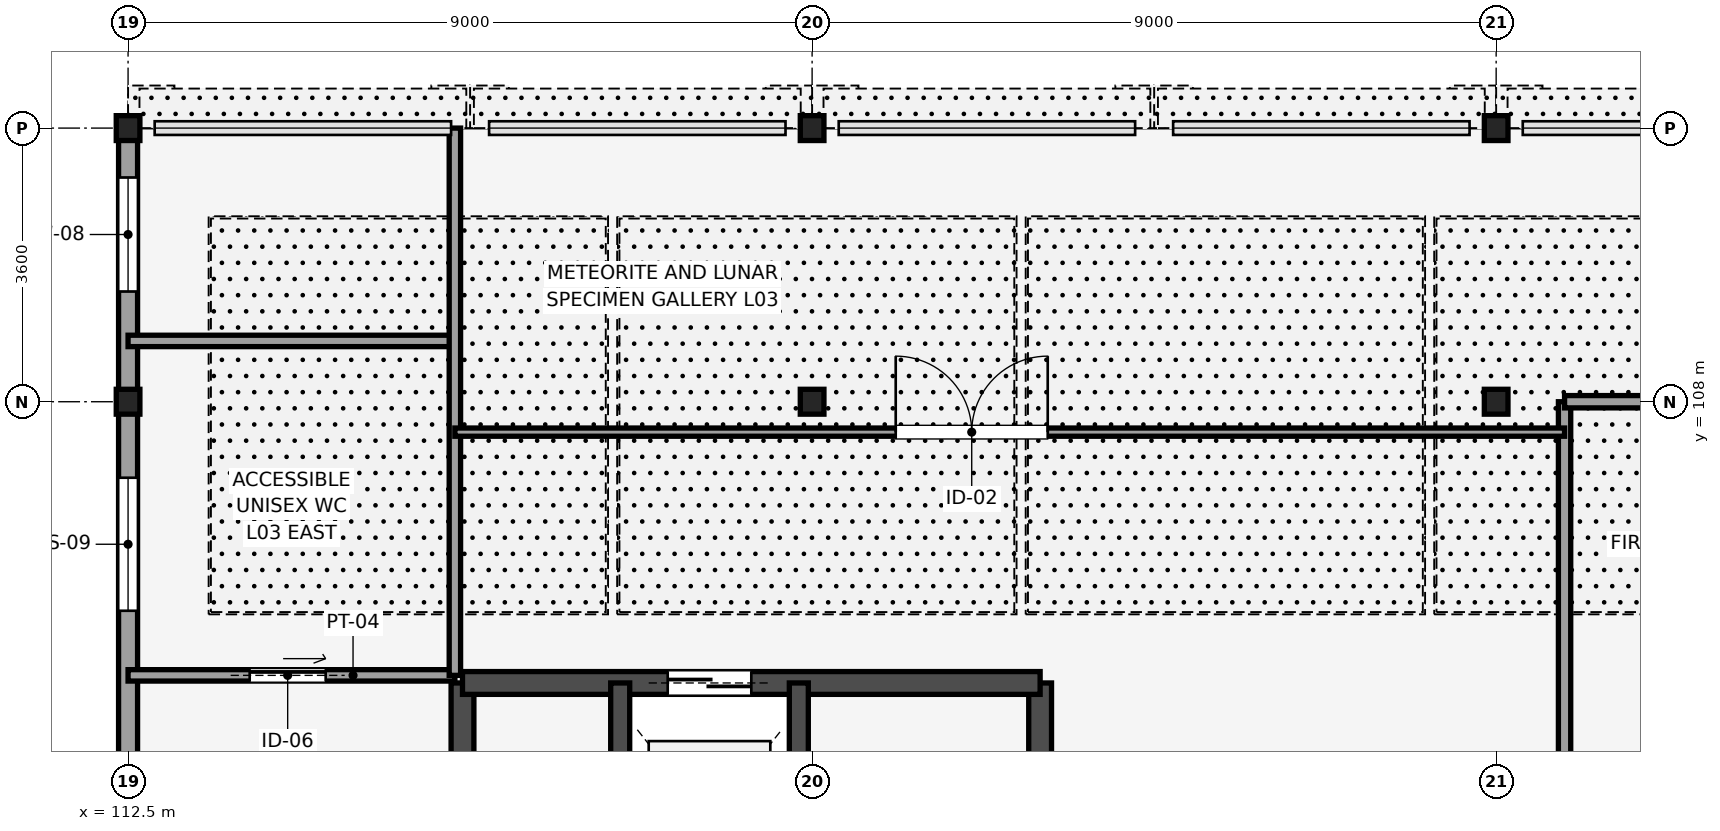
"""IFC4 building model, lengths in metres.
Left out: names, types, materials, properties, quantities, classifications, styles, units other than length and angle.
Written with IfcOpenShell. Run it as: python <this file> out.ifc"""

import sys

from ifc_helpers import new_model, si_unit, direction, frame, frame_2d, origin, origin_2d, place, context, subcontext, project, spatial, rectangle, i_section, extrude, element, fill, save


model = new_model("IFC4")
c1 = context("Model", 3, precision=1e-05, world=origin(), true_north=direction((0.0, 1.0)))
c2 = subcontext(c1, "Body", "Model", "MODEL_VIEW")
j1 = project(units=[si_unit("LENGTHUNIT", "METRE"), si_unit("PLANEANGLEUNIT", "RADIAN")], contexts=[c1])
p1 = place(None, origin())
s1 = spatial("IfcSite", under=j1, at=p1, CompositionType="ELEMENT")
p2 = place(p1, origin())
s2 = spatial("IfcBuilding", under=s1, at=p2, CompositionType="ELEMENT")
p3 = place(p2, frame((0.0, 0.0, 14.4)))
s3 = spatial("IfcBuildingStorey", under=s2, at=p3, CompositionType="ELEMENT", Elevation=14.4)
for number, where, z_axis, x_axis in (
    (1, (112.5, 108.0, 0.0), (0.0, 0.0, 1.0), (1.0, 0.0, 0.0)),
    (2, (112.5, 111.6, 0.0), (0.0, 0.0, 1.0), (1.0, 0.0, 0.0)),
    (3, (121.5, 108.0, 0.0), (0.0, 0.0, 1.0), (1.0, 0.0, 0.0)),
    (4, (121.5, 111.6, 0.0), (0.0, 0.0, 1.0), (1.0, 0.0, 0.0)),
    (5, (130.5, 108.0, 0.0), (0.0, 0.0, 1.0), (1.0, 0.0, 0.0)),
    (6, (130.5, 111.6, 0.0), (0.0, 0.0, 1.0), (1.0, 0.0, 0.0)),
):
    element("IfcColumn", number, at=place(p3, frame(where, z_axis=z_axis, x_axis=x_axis)), inside=s3, PredefinedType="COLUMN", context=c2, shape_type="SweptSolid", body=[
        extrude(i_section(OverallWidth=0.311, OverallDepth=0.327, WebThickness=0.016, FlangeThickness=0.025, FilletRadius=0.017, at=origin_2d()), origin(), (0.0, 0.0, 1.0), 4.5),
    ])
p4 = place(p3, frame((116.9, 96.7, 0.0), z_axis=(0.0, 0.0, 1.0), x_axis=(0.0, 1.0, 0.0)))
e7 = element("IfcWall", 7, at=p4, inside=s3, PredefinedType="SHEAR", context=c2, shape_type="SweptSolid", body=[
    extrude(rectangle(XDim=7.6, YDim=0.3, at=frame_2d((3.8, 0.0))), origin(), (0.0, 0.0, 1.0), 4.5),
])
p5 = place(p4, frame((0.45, 0.0, 0.0)))
e8 = element("IfcOpeningElement", 8, at=p5, cuts=e7, PredefinedType="OPENING", context=c2, shape_type="SweptSolid", body=[
    extrude(rectangle(XDim=1.15, YDim=2.15, at=frame_2d((0.575, 1.075))), frame((0.0, 0.16, 0.0), z_axis=(0.0, -1.0, 0.0), x_axis=(1.0, 0.0, 0.0)), (0.0, 0.0, 1.0), 0.32),
])
p6 = place(p3, frame((124.5, 96.7, 0.0), z_axis=(0.0, 0.0, 1.0), x_axis=(0.0, 1.0, 0.0)))
e9 = element("IfcWall", 9, at=p6, inside=s3, PredefinedType="SHEAR", context=c2, shape_type="SweptSolid", body=[
    extrude(rectangle(XDim=7.6, YDim=0.3, at=frame_2d((3.8, 0.0))), origin(), (0.0, 0.0, 1.0), 4.5),
])
p7 = place(p3, frame((116.9, 104.3, 0.0), z_axis=(0.0, 0.0, 1.0), x_axis=(1.0, 0.0, 0.0)))
e10 = element("IfcWall", 10, at=p7, inside=s3, PredefinedType="SHEAR", context=c2, shape_type="SweptSolid", body=[
    extrude(rectangle(XDim=7.6, YDim=0.3, at=frame_2d((3.8, 0.0))), origin(), (0.0, 0.0, 1.0), 4.5),
])
p8 = place(p7, frame((2.7, 0.0, 0.0)))
e11 = element("IfcOpeningElement", 11, at=p8, cuts=e10, PredefinedType="OPENING", context=c2, shape_type="SweptSolid", body=[
    extrude(rectangle(XDim=1.1, YDim=2.2, at=frame_2d((0.55, 1.1))), frame((0.0, 0.16, 0.0), z_axis=(0.0, -1.0, 0.0), x_axis=(1.0, 0.0, 0.0)), (0.0, 0.0, 1.0), 0.32),
])
for number, where, z_axis, x_axis in (
    (12, (118.975, 100.695, 0.0), (0.0, 0.0, 1.0), (0.0, 1.0, 0.0)),
    (13, (121.325, 100.695, 0.0), (0.0, 0.0, 1.0), (0.0, 1.0, 0.0)),
):
    element("IfcWall", number, at=place(p3, frame(where, z_axis=z_axis, x_axis=x_axis)), inside=s3, PredefinedType="SHEAR", context=c2, shape_type="SweptSolid", body=[
        extrude(rectangle(XDim=3.605, YDim=0.25, at=frame_2d((1.802, 0.0))), origin(), (0.0, 0.0, 1.0), 4.5),
    ])
p9 = place(p3, frame((112.5, 111.6, 0.0), z_axis=(0.0, 0.0, 1.0), x_axis=(0.0, -1.0, 0.0)))
e14 = element("IfcWall", 14, at=p9, inside=s3, PredefinedType="STANDARD", context=c2, shape_type="SweptSolid", body=[
    extrude(rectangle(XDim=12.6, YDim=0.25, at=frame_2d((6.3, 0.0))), origin(), (0.0, 0.0, 1.0), 3.816),
])
p10 = place(p9, frame((0.65, 0.0, 1.0)))
e15 = element("IfcOpeningElement", 15, at=p10, cuts=e14, PredefinedType="OPENING", context=c2, shape_type="SweptSolid", body=[
    extrude(rectangle(XDim=1.5, YDim=1.5, at=frame_2d((0.75, 0.75))), frame((0.0, 0.135, 0.0), z_axis=(0.0, -1.0, 0.0), x_axis=(1.0, 0.0, 0.0)), (0.0, 0.0, 1.0), 0.27),
])
p11 = place(p9, frame((8.9, 0.0, 1.0)))
e16 = element("IfcOpeningElement", 16, at=p11, cuts=e14, PredefinedType="OPENING", context=c2, shape_type="SweptSolid", body=[
    extrude(rectangle(XDim=1.5, YDim=1.5, at=frame_2d((0.75, 0.75))), frame((0.0, 0.135, 0.0), z_axis=(0.0, -1.0, 0.0), x_axis=(1.0, 0.0, 0.0)), (0.0, 0.0, 1.0), 0.27),
])
p12 = place(p9, frame((4.6, 0.0, 1.0)))
e17 = element("IfcOpeningElement", 17, at=p12, cuts=e14, PredefinedType="OPENING", context=c2, shape_type="SweptSolid", body=[
    extrude(rectangle(XDim=1.75, YDim=1.55, at=frame_2d((0.875, 0.775))), frame((0.0, 0.135, 0.0), z_axis=(0.0, -1.0, 0.0), x_axis=(1.0, 0.0, 0.0)), (0.0, 0.0, 1.0), 0.27),
])
p13 = place(p3, frame((131.4, 96.6, 0.0), z_axis=(0.0, 0.0, 1.0), x_axis=(0.0, 1.0, 0.0)))
e18 = element("IfcWall", 18, at=p13, inside=s3, PredefinedType="PARTITIONING", context=c2, shape_type="SweptSolid", body=[
    extrude(rectangle(XDim=11.4, YDim=0.162, at=frame_2d((5.7, 0.0))), origin(), (0.0, 0.0, 1.0), 4.32),
])
p14 = place(p13, frame((3.8, 0.0, 0.0)))
e19 = element("IfcOpeningElement", 19, at=p14, cuts=e18, PredefinedType="OPENING", context=c2, shape_type="SweptSolid", body=[
    extrude(rectangle(XDim=1.51, YDim=2.175, at=frame_2d((0.755, 1.087))), frame((0.0, 0.091, 0.0), z_axis=(0.0, -1.0, 0.0), x_axis=(1.0, 0.0, 0.0)), (0.0, 0.0, 1.0), 0.182),
])
p15 = place(p3, frame((131.4, 108.0, 0.0), z_axis=(0.0, 0.0, 1.0), x_axis=(1.0, 0.0, 0.0)))
e20 = element("IfcWall", 20, at=p15, inside=s3, PredefinedType="PARTITIONING", context=c2, shape_type="SweptSolid", body=[
    extrude(rectangle(XDim=11.6, YDim=0.162, at=frame_2d((5.8, 0.0))), origin(), (0.0, 0.0, 1.0), 3.816),
])
p16 = place(p3, frame((112.5, 104.4, 0.0), z_axis=(0.0, 0.0, 1.0), x_axis=(1.0, 0.0, 0.0)))
e21 = element("IfcWall", 21, at=p16, inside=s3, PredefinedType="PARTITIONING", context=c2, shape_type="SweptSolid", body=[
    extrude(rectangle(XDim=4.3, YDim=0.15, at=frame_2d((2.15, 0.0))), origin(), (0.0, 0.0, 1.0), 4.32),
])
p17 = place(p16, frame((1.6, 0.0, 0.0)))
e22 = element("IfcOpeningElement", 22, at=p17, cuts=e21, PredefinedType="OPENING", context=c2, shape_type="SweptSolid", body=[
    extrude(rectangle(XDim=1.0, YDim=2.15, at=frame_2d((0.5, 1.075))), frame((0.0, 0.085, 0.0), z_axis=(0.0, -1.0, 0.0), x_axis=(1.0, 0.0, 0.0)), (0.0, 0.0, 1.0), 0.17),
])
p18 = place(p3, frame((112.5, 108.8, 0.0), z_axis=(0.0, 0.0, 1.0), x_axis=(1.0, 0.0, 0.0)))
e23 = element("IfcWall", 23, at=p18, inside=s3, PredefinedType="PARTITIONING", context=c2, shape_type="SweptSolid", body=[
    extrude(rectangle(XDim=4.3, YDim=0.15, at=frame_2d((2.15, 0.0))), origin(), (0.0, 0.0, 1.0), 4.32),
])
p19 = place(p3, frame((116.8, 104.4, 0.0), z_axis=(0.0, 0.0, 1.0), x_axis=(0.0, 1.0, 0.0)))
e24 = element("IfcWall", 24, at=p19, inside=s3, PredefinedType="PARTITIONING", context=c2, shape_type="SweptSolid", body=[
    extrude(rectangle(XDim=7.2, YDim=0.15, at=frame_2d((3.6, 0.0))), origin(), (0.0, 0.0, 1.0), 4.32),
])
p20 = place(p3, frame((116.8, 107.6, 0.0), z_axis=(0.0, 0.0, 1.0), x_axis=(1.0, 0.0, 0.0)))
e25 = element("IfcWall", 25, at=p20, inside=s3, PredefinedType="PARTITIONING", context=c2, shape_type="SweptSolid", body=[
    extrude(rectangle(XDim=14.6, YDim=0.108, at=frame_2d((7.3, 0.0))), origin(), (0.0, 0.0, 1.0), 4.32),
])
p21 = place(p20, frame((5.8, 0.0, 0.0)))
e26 = element("IfcOpeningElement", 26, at=p21, cuts=e25, PredefinedType="OPENING", context=c2, shape_type="SweptSolid", body=[
    extrude(rectangle(XDim=2.0, YDim=2.4, at=frame_2d((1.0, 1.2))), frame((0.0, 0.064, 0.0), z_axis=(0.0, -1.0, 0.0), x_axis=(1.0, 0.0, 0.0)), (0.0, 0.0, 1.0), 0.128),
])
p22 = place(p10, origin())
e27 = element("IfcWindow", 27, at=p22, inside=s3, PartitioningType="SINGLE_PANEL", PredefinedType="WINDOW", context=c2, shape_type="SweptSolid", body=[
    extrude(rectangle(XDim=1.5, YDim=1.5, at=frame_2d((0.75, 0.75))), frame((0.0, 0.03, 0.0), z_axis=(0.0, -1.0, 0.0), x_axis=(1.0, 0.0, 0.0)), (0.0, 0.0, 1.0), 0.06),
])
fill(e15, e27)
p23 = place(p12, origin())
e28 = element("IfcWindow", 28, at=p23, inside=s3, PartitioningType="SINGLE_PANEL", PredefinedType="WINDOW", context=c2, shape_type="SweptSolid", body=[
    extrude(rectangle(XDim=1.75, YDim=1.55, at=frame_2d((0.875, 0.775))), frame((0.0, 0.03, 0.0), z_axis=(0.0, -1.0, 0.0), x_axis=(1.0, 0.0, 0.0)), (0.0, 0.0, 1.0), 0.06),
])
fill(e17, e28)
p24 = place(p8, origin())
e29 = element("IfcDoor", 29, at=p24, inside=s3, OperationType="DOUBLE_DOOR_SLIDING", PredefinedType="DOOR", context=c2, shape_type="SweptSolid", body=[
    extrude(rectangle(XDim=1.1, YDim=2.2, at=frame_2d((0.55, 1.1))), frame((0.0, 0.025, 0.0), z_axis=(0.0, -1.0, 0.0), x_axis=(1.0, 0.0, 0.0)), (0.0, 0.0, 1.0), 0.05),
])
fill(e11, e29)
p25 = place(p17, origin())
e30 = element("IfcDoor", 30, at=p25, inside=s3, OperationType="SLIDING_TO_LEFT", PredefinedType="DOOR", context=c2, shape_type="SweptSolid", body=[
    extrude(rectangle(XDim=1.0, YDim=2.15, at=frame_2d((0.5, 1.075))), frame((0.0, 0.025, 0.0), z_axis=(0.0, -1.0, 0.0), x_axis=(1.0, 0.0, 0.0)), (0.0, 0.0, 1.0), 0.05),
])
fill(e22, e30)
p26 = place(p21, origin())
e31 = element("IfcDoor", 31, at=p26, inside=s3, OperationType="DOUBLE_DOOR_DOUBLE_SWING", PredefinedType="DOOR", context=c2, shape_type="SweptSolid", body=[
    extrude(rectangle(XDim=2.0, YDim=2.4, at=frame_2d((1.0, 1.2))), frame((0.0, 0.025, 0.0), z_axis=(0.0, -1.0, 0.0), x_axis=(1.0, 0.0, 0.0)), (0.0, 0.0, 1.0), 0.05),
])
fill(e26, e31)
save(model, sys.argv[1])
